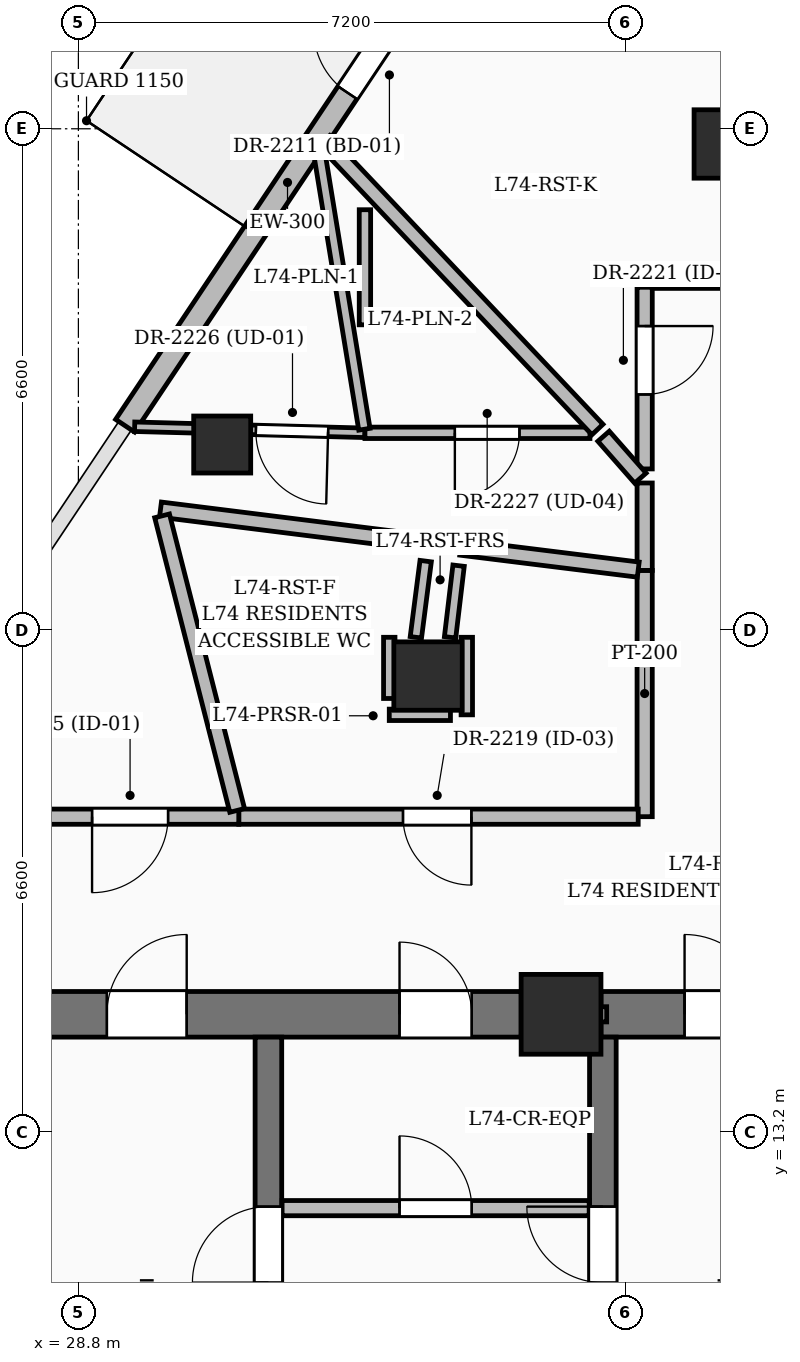
"""IFC4 building model, lengths in metres.
Left out: names, types, materials, properties, quantities, classifications, styles, units other than length and angle.
Written with IfcOpenShell. Run it as: python <this file> out.ifc"""

import sys

from ifc_helpers import new_model, si_unit, direction, frame, frame_2d, origin, origin_2d, place, context, subcontext, project, spatial, rectangle, extrude, element, fill, save


model = new_model("IFC4")
c1 = context("Model", 3, precision=1e-05, world=origin(), true_north=direction((0.0, 1.0)))
c2 = subcontext(c1, "Body", "Model", "MODEL_VIEW")
j1 = project(units=[si_unit("LENGTHUNIT", "METRE"), si_unit("PLANEANGLEUNIT", "RADIAN")], contexts=[c1])
p1 = place(None, origin())
s1 = spatial("IfcSite", under=j1, at=p1, CompositionType="ELEMENT")
p2 = place(p1, origin())
s2 = spatial("IfcBuilding", under=s1, at=p2, CompositionType="ELEMENT")
p3 = place(p2, frame((0.0, 0.0, 285.75)))
s3 = spatial("IfcBuildingStorey", under=s2, at=p3, CompositionType="ELEMENT", Elevation=285.75)
p4 = place(p3, frame((35.15, 14.75, 0.0), z_axis=(0.0, 0.0, 1.0), x_axis=(1.0, 0.0, 0.0)))
e1 = element("IfcColumn", 1, at=p4, inside=s3, PredefinedType="COLUMN", context=c2, shape_type="SweptSolid", body=[
    extrude(rectangle(XDim=1.05, YDim=1.05, at=origin_2d()), origin(), (0.0, 0.0, 1.0), 3.75),
])
for number, where, z_axis, x_axis in (
    (2, (37.35, 26.2, 0.0), (0.0, 0.0, 1.0), (1.0, 0.0, 0.0)),
    (3, (33.4, 19.2, 0.0), (0.0, 0.0, 1.0), (1.0, 0.0, 0.0)),
):
    element("IfcColumn", number, at=place(p3, frame(where, z_axis=z_axis, x_axis=x_axis)), inside=s3, PredefinedType="COLUMN", context=c2, shape_type="SweptSolid", body=[
        extrude(rectangle(XDim=0.9, YDim=0.9, at=origin_2d()), origin(), (0.0, 0.0, 1.0), 3.75),
    ])
p5 = place(p3, frame((28.075, 14.75, 0.0), z_axis=(0.0, 0.0, 1.0), x_axis=(1.0, 0.0, 0.0)))
e4 = element("IfcWall", 4, at=p5, inside=s3, PredefinedType="SHEAR", context=c2, shape_type="SweptSolid", body=[
    extrude(rectangle(XDim=6.55, YDim=0.6, at=frame_2d((3.275, 0.0))), origin(), (0.0, 0.0, 1.0), 3.75),
])
p6 = place(p5, frame((1.1, 0.0, 0.0)))
e5 = element("IfcOpeningElement", 5, at=p6, cuts=e4, PredefinedType="OPENING", context=c2, shape_type="SweptSolid", body=[
    extrude(rectangle(XDim=1.05, YDim=2.15, at=frame_2d((0.525, 1.075))), frame((0.0, 0.31, 0.0), z_axis=(0.0, -1.0, 0.0), x_axis=(1.0, 0.0, 0.0)), (0.0, 0.0, 1.0), 0.62),
])
p7 = place(p5, frame((4.95, 0.0, 0.0)))
e6 = element("IfcOpeningElement", 6, at=p7, cuts=e4, PredefinedType="OPENING", context=c2, shape_type="SweptSolid", body=[
    extrude(rectangle(XDim=0.95, YDim=2.15, at=frame_2d((0.475, 1.075))), frame((0.0, 0.31, 0.0), z_axis=(0.0, -1.0, 0.0), x_axis=(1.0, 0.0, 0.0)), (0.0, 0.0, 1.0), 0.62),
])
p8 = place(p3, frame((35.675, 14.75, 0.0), z_axis=(0.0, 0.0, 1.0), x_axis=(1.0, 0.0, 0.0)))
e7 = element("IfcWall", 7, at=p8, inside=s3, PredefinedType="SHEAR", context=c2, shape_type="SweptSolid", body=[
    extrude(rectangle(XDim=10.85, YDim=0.6, at=frame_2d((5.425, 0.0))), origin(), (0.0, 0.0, 1.0), 3.75),
])
p9 = place(p8, frame((1.1, 0.0, 0.0)))
e8 = element("IfcOpeningElement", 8, at=p9, cuts=e7, PredefinedType="OPENING", context=c2, shape_type="SweptSolid", body=[
    extrude(rectangle(XDim=1.05, YDim=2.15, at=frame_2d((0.525, 1.075))), frame((0.0, 0.31, 0.0), z_axis=(0.0, -1.0, 0.0), x_axis=(1.0, 0.0, 0.0)), (0.0, 0.0, 1.0), 0.62),
])
p10 = place(p8, frame((8.7, 0.0, 0.0)))
e9 = element("IfcOpeningElement", 9, at=p10, cuts=e7, PredefinedType="OPENING", context=c2, shape_type="SweptSolid", body=[
    extrude(rectangle(XDim=1.05, YDim=2.15, at=frame_2d((0.525, 1.075))), frame((0.0, 0.31, 0.0), z_axis=(0.0, -1.0, 0.0), x_axis=(1.0, 0.0, 0.0)), (0.0, 0.0, 1.0), 0.62),
])
p11 = place(p8, frame((3.825, 0.0, 0.0)))
e10 = element("IfcOpeningElement", 10, at=p11, cuts=e7, PredefinedType="OPENING", context=c2, shape_type="SweptSolid", body=[
    extrude(rectangle(XDim=1.2, YDim=2.2, at=frame_2d((0.6, 1.1))), frame((0.0, 0.31, 0.0), z_axis=(0.0, -1.0, 0.0), x_axis=(1.0, 0.0, 0.0)), (0.0, 0.0, 1.0), 0.62),
])
p12 = place(p8, frame((5.825, 0.0, 0.0)))
e11 = element("IfcOpeningElement", 11, at=p12, cuts=e7, PredefinedType="OPENING", context=c2, shape_type="SweptSolid", body=[
    extrude(rectangle(XDim=1.2, YDim=2.2, at=frame_2d((0.6, 1.1))), frame((0.0, 0.31, 0.0), z_axis=(0.0, -1.0, 0.0), x_axis=(1.0, 0.0, 0.0)), (0.0, 0.0, 1.0), 0.62),
])
p13 = place(p3, frame((31.3, 5.2, 0.0), z_axis=(0.0, 0.0, 1.0), x_axis=(0.0, 1.0, 0.0)))
e12 = element("IfcWall", 12, at=p13, inside=s3, PredefinedType="SOLIDWALL", context=c2, shape_type="SweptSolid", body=[
    extrude(rectangle(XDim=9.25, YDim=0.35, at=frame_2d((4.625, 0.0))), origin(), (0.0, 0.0, 1.0), 3.75),
])
p14 = place(p13, frame((6.02, 0.0, 0.0)))
e13 = element("IfcOpeningElement", 13, at=p14, cuts=e12, PredefinedType="OPENING", context=c2, shape_type="SweptSolid", body=[
    extrude(rectangle(XDim=1.0, YDim=2.15, at=frame_2d((0.5, 1.075))), frame((0.0, 0.185, 0.0), z_axis=(0.0, -1.0, 0.0), x_axis=(1.0, 0.0, 0.0)), (0.0, 0.0, 1.0), 0.37),
])
p15 = place(p3, frame((35.7, 5.2, 0.0), z_axis=(0.0, 0.0, 1.0), x_axis=(0.0, 1.0, 0.0)))
e14 = element("IfcWall", 14, at=p15, inside=s3, PredefinedType="SOLIDWALL", context=c2, shape_type="SweptSolid", body=[
    extrude(rectangle(XDim=9.25, YDim=0.35, at=frame_2d((4.625, 0.0))), origin(), (0.0, 0.0, 1.0), 3.75),
])
p16 = place(p15, frame((6.02, 0.0, 0.0)))
e15 = element("IfcOpeningElement", 15, at=p16, cuts=e14, PredefinedType="OPENING", context=c2, shape_type="SweptSolid", body=[
    extrude(rectangle(XDim=1.0, YDim=2.15, at=frame_2d((0.5, 1.075))), frame((0.0, 0.185, 0.0), z_axis=(0.0, -1.0, 0.0), x_axis=(1.0, 0.0, 0.0)), (0.0, 0.0, 1.0), 0.37),
])
p17 = place(p3, frame((30.692, 22.246, 0.0), z_axis=(0.0, 0.0, 1.0), x_axis=(1.0, 0.0, 0.0)))
e16 = element("IfcColumn", 16, at=p17, inside=s3, PredefinedType="COLUMN", context=c2, shape_type="SweptSolid", body=[
    extrude(rectangle(XDim=0.75, YDim=0.75, at=origin_2d()), origin(), (0.0, 0.0, 1.0), 3.75),
])
p18 = place(p3, frame((29.415, 22.493, 0.0), z_axis=(0.0, 0.0, 1.0), x_axis=(0.5552198311, 0.831703636612, 0.0)))
e17 = element("IfcWall", 17, at=p18, inside=s3, PredefinedType="SOLIDWALL", context=c2, shape_type="SweptSolid", body=[
    extrude(rectangle(XDim=7.696, YDim=0.3, at=frame_2d((3.848, 0.0))), origin(), (0.0, 0.0, 1.0), 3.45),
])
p19 = place(p18, frame((5.269, 0.0, 0.0)))
e18 = element("IfcOpeningElement", 18, at=p19, cuts=e17, PredefinedType="OPENING", context=c2, shape_type="SweptSolid", body=[
    extrude(rectangle(XDim=1.0, YDim=2.2, at=frame_2d((0.5, 1.1))), frame((0.0, 0.16, 0.0), z_axis=(0.0, -1.0, 0.0), x_axis=(1.0, 0.0, 0.0)), (0.0, 0.0, 1.0), 0.32),
])
p20 = place(p3, frame((34.72, 14.75, 0.0), z_axis=(0.0, 0.0, 1.0), x_axis=(1.0, 0.0, 0.0)))
e19 = element("IfcWall", 19, at=p20, inside=s3, PredefinedType="PARTITIONING", context=c2, shape_type="SweptSolid", body=[
    extrude(rectangle(XDim=1.03, YDim=0.2, at=frame_2d((0.515, 0.0))), origin(), (0.0, 0.0, 1.0), 2.635),
])
p21 = place(p3, frame((31.48, 12.2, 0.0), z_axis=(0.0, 0.0, 1.0), x_axis=(1.0, 0.0, 0.0)))
e20 = element("IfcWall", 20, at=p21, inside=s3, PredefinedType="PARTITIONING", context=c2, shape_type="SweptSolid", body=[
    extrude(rectangle(XDim=4.04, YDim=0.2, at=frame_2d((2.02, 0.0))), origin(), (0.0, 0.0, 1.0), 3.45),
])
p22 = place(p21, frame((1.545, 0.0, 0.0)))
e21 = element("IfcOpeningElement", 21, at=p22, cuts=e20, PredefinedType="OPENING", context=c2, shape_type="SweptSolid", body=[
    extrude(rectangle(XDim=0.95, YDim=2.15, at=frame_2d((0.475, 1.075))), frame((0.0, 0.11, 0.0), z_axis=(0.0, -1.0, 0.0), x_axis=(1.0, 0.0, 0.0)), (0.0, 0.0, 1.0), 0.22),
])
p23 = place(p3, frame((36.25, 20.59, 0.0), z_axis=(0.0, 0.0, 1.0), x_axis=(0.0, -1.0, 0.0)))
e22 = element("IfcWall", 22, at=p23, inside=s3, PredefinedType="PARTITIONING", context=c2, shape_type="SweptSolid", body=[
    extrude(rectangle(XDim=3.24, YDim=0.2, at=frame_2d((1.62, 0.0))), origin(), (0.0, 0.0, 1.0), 3.45),
])
p24 = place(p3, frame((36.165, 17.35, 0.0), z_axis=(0.0, 0.0, 1.0), x_axis=(-1.0, 0.0, 0.0)))
e23 = element("IfcWall", 23, at=p24, inside=s3, PredefinedType="PARTITIONING", context=c2, shape_type="SweptSolid", body=[
    extrude(rectangle(XDim=5.255, YDim=0.2, at=frame_2d((2.627, 0.0))), origin(), (0.0, 0.0, 1.0), 2.635),
])
p25 = place(p24, frame((2.194, 0.0, 0.0)))
e24 = element("IfcOpeningElement", 24, at=p25, cuts=e23, PredefinedType="OPENING", context=c2, shape_type="SweptSolid", body=[
    extrude(rectangle(XDim=0.9, YDim=2.1, at=frame_2d((0.45, 1.05))), frame((0.0, 0.11, 0.0), z_axis=(0.0, -1.0, 0.0), x_axis=(1.0, 0.0, 0.0)), (0.0, 0.0, 1.0), 0.22),
])
p26 = place(p3, frame((30.91, 17.35, 0.0), z_axis=(0.0, 0.0, 1.0), x_axis=(-1.0, 0.0, 0.0)))
e25 = element("IfcWall", 25, at=p26, inside=s3, PredefinedType="PARTITIONING", context=c2, shape_type="SweptSolid", body=[
    extrude(rectangle(XDim=2.86, YDim=0.2, at=frame_2d((1.43, 0.0))), origin(), (0.0, 0.0, 1.0), 3.45),
])
p27 = place(p26, frame((0.93, 0.0, 0.0)))
e26 = element("IfcOpeningElement", 26, at=p27, cuts=e25, PredefinedType="OPENING", context=c2, shape_type="SweptSolid", body=[
    extrude(rectangle(XDim=1.0, YDim=2.2, at=frame_2d((0.5, 1.1))), frame((0.0, 0.11, 0.0), z_axis=(0.0, -1.0, 0.0), x_axis=(1.0, 0.0, 0.0)), (0.0, 0.0, 1.0), 0.22),
])
p28 = place(p3, frame((36.25, 21.74, 0.0), z_axis=(0.0, 0.0, 1.0), x_axis=(0.0, -1.0, 0.0)))
e27 = element("IfcWall", 27, at=p28, inside=s3, PredefinedType="PARTITIONING", context=c2, shape_type="SweptSolid", body=[
    extrude(rectangle(XDim=1.15, YDim=0.2, at=frame_2d((0.575, 0.0))), origin(), (0.0, 0.0, 1.0), 3.45),
])
p29 = place(p3, frame((38.115, 24.4, 0.0), z_axis=(0.0, 0.0, 1.0), x_axis=(-1.0, 0.0, 0.0)))
e28 = element("IfcWall", 28, at=p29, inside=s3, PredefinedType="PARTITIONING", context=c2, shape_type="SweptSolid", body=[
    extrude(rectangle(XDim=1.865, YDim=0.2, at=frame_2d((0.933, 0.0))), origin(), (0.0, 0.0, 1.0), 2.635),
])
p30 = place(p3, frame((36.25, 24.315, 0.0), z_axis=(0.0, 0.0, 1.0), x_axis=(0.0, -1.0, 0.0)))
e29 = element("IfcWall", 29, at=p30, inside=s3, PredefinedType="PARTITIONING", context=c2, shape_type="SweptSolid", body=[
    extrude(rectangle(XDim=2.39, YDim=0.2, at=frame_2d((1.195, 0.0))), origin(), (0.0, 0.0, 1.0), 2.635),
])
p31 = place(p30, frame((0.51, 0.0, 0.0)))
e30 = element("IfcOpeningElement", 30, at=p31, cuts=e29, PredefinedType="OPENING", context=c2, shape_type="SweptSolid", body=[
    extrude(rectangle(XDim=0.9, YDim=2.1, at=frame_2d((0.45, 1.05))), frame((0.0, 0.11, 0.0), z_axis=(0.0, -1.0, 0.0), x_axis=(1.0, 0.0, 0.0)), (0.0, 0.0, 1.0), 0.22),
])
p32 = place(p3, frame((33.4, 20.95, 0.0), z_axis=(0.0, 0.0, 1.0), x_axis=(-0.992279994178, 0.124017793696, 0.0)))
e31 = element("IfcWall", 31, at=p32, inside=s3, PredefinedType="PARTITIONING", context=c2, shape_type="SweptSolid", body=[
    extrude(rectangle(XDim=3.547, YDim=0.2, at=frame_2d((1.774, 0.0))), origin(), (0.0, 0.0, 1.0), 2.641),
])
p33 = place(p3, frame((29.901, 21.308, 0.0), z_axis=(0.0, 0.0, 1.0), x_axis=(0.24705765536, -0.969000781696, 0.0)))
e32 = element("IfcWall", 32, at=p33, inside=s3, PredefinedType="PARTITIONING", context=c2, shape_type="SweptSolid", body=[
    extrude(rectangle(XDim=3.999, YDim=0.2, at=frame_2d((2.0, 0.0))), origin(), (0.0, 0.0, 1.0), 2.641),
])
p34 = place(p3, frame((36.166, 20.601, 0.0), z_axis=(0.0, 0.0, 1.0), x_axis=(-0.992414530334, 0.122936568936, 0.0)))
e33 = element("IfcWall", 33, at=p34, inside=s3, PredefinedType="PARTITIONING", context=c2, shape_type="SweptSolid", body=[
    extrude(rectangle(XDim=2.353, YDim=0.2, at=frame_2d((1.177, 0.0))), origin(), (0.0, 0.0, 1.0), 2.635),
])
p35 = place(p3, frame((32.57, 22.4, 0.0), z_axis=(0.0, 0.0, 1.0), x_axis=(-0.999650958783, 0.02641894404, 0.0)))
e34 = element("IfcWall", 34, at=p35, inside=s3, PredefinedType="PARTITIONING", context=c2, shape_type="SweptSolid", body=[
    extrude(rectangle(XDim=3.031, YDim=0.125, at=frame_2d((1.516, 0.0))), origin(), (0.0, 0.0, 1.0), 3.45),
])
p36 = place(p35, frame((0.485, 0.0, 0.0)))
e35 = element("IfcOpeningElement", 35, at=p36, cuts=e34, PredefinedType="OPENING", context=c2, shape_type="SweptSolid", body=[
    extrude(rectangle(XDim=0.95, YDim=2.2, at=frame_2d((0.475, 1.1))), frame((0.0, 0.072, 0.0), z_axis=(0.0, -1.0, 0.0), x_axis=(1.0, 0.0, 0.0)), (0.0, 0.0, 1.0), 0.145),
])
p37 = place(p3, frame((35.53, 22.4, 0.0), z_axis=(0.0, 0.0, 1.0), x_axis=(-1.0, 0.0, 0.0)))
e36 = element("IfcWall", 36, at=p37, inside=s3, PredefinedType="PARTITIONING", context=c2, shape_type="SweptSolid", body=[
    extrude(rectangle(XDim=2.96, YDim=0.15, at=frame_2d((1.48, 0.0))), origin(), (0.0, 0.0, 1.0), 2.635),
])
p38 = place(p37, frame((0.927, 0.0, 0.0)))
e37 = element("IfcOpeningElement", 37, at=p38, cuts=e36, PredefinedType="OPENING", context=c2, shape_type="SweptSolid", body=[
    extrude(rectangle(XDim=0.85, YDim=2.1, at=frame_2d((0.425, 1.05))), frame((0.0, 0.085, 0.0), z_axis=(0.0, -1.0, 0.0), x_axis=(1.0, 0.0, 0.0)), (0.0, 0.0, 1.0), 0.17),
])
p39 = place(p3, frame((36.194, 21.804, 0.0), z_axis=(0.0, 0.0, 1.0), x_axis=(-0.659869913994, 0.751379861724, 0.0)))
e38 = element("IfcWall", 38, at=p39, inside=s3, PredefinedType="PARTITIONING", context=c2, shape_type="SweptSolid", body=[
    extrude(rectangle(XDim=0.734, YDim=0.2, at=frame_2d((0.367, 0.0))), origin(), (0.0, 0.0, 1.0), 3.45),
])
p40 = place(p3, frame((32.563, 22.447, 0.0), z_axis=(0.0, 0.0, 1.0), x_axis=(-0.161074254275, 0.986942290415, 0.0)))
e39 = element("IfcWall", 39, at=p40, inside=s3, PredefinedType="PARTITIONING", context=c2, shape_type="SweptSolid", body=[
    extrude(rectangle(XDim=3.704, YDim=0.15, at=frame_2d((1.852, 0.0))), origin(), (0.0, 0.0, 1.0), 2.641),
])
p41 = place(p3, frame((35.629, 22.444, 0.0), z_axis=(0.0, 0.0, 1.0), x_axis=(-0.687396257766, 0.726282579173, 0.0)))
e40 = element("IfcWall", 40, at=p41, inside=s3, PredefinedType="PARTITIONING", context=c2, shape_type="SweptSolid", body=[
    extrude(rectangle(XDim=5.23, YDim=0.2, at=frame_2d((2.615, 0.0))), origin(), (0.0, 0.0, 1.0), 2.635),
])
p42 = place(p3, frame((33.802, 20.652, 0.0), z_axis=(0.0, 0.0, 1.0), x_axis=(-0.118110191018, -0.993000494853, 0.0)))
e41 = element("IfcWall", 41, at=p42, inside=s3, PredefinedType="PARTITIONING", context=c2, shape_type="SweptSolid", body=[
    extrude(rectangle(XDim=0.949, YDim=0.15, at=frame_2d((0.474, 0.0))), origin(), (0.0, 0.0, 1.0), 2.635),
])
p43 = place(p3, frame((33.91, 19.71, 0.0), z_axis=(0.0, 0.0, 1.0), x_axis=(0.0, -1.0, 0.0)))
e42 = element("IfcWall", 42, at=p43, inside=s3, PredefinedType="PARTITIONING", context=c2, shape_type="SweptSolid", body=[
    extrude(rectangle(XDim=1.02, YDim=0.15, at=frame_2d((0.51, 0.0))), origin(), (0.0, 0.0, 1.0), 2.635),
])
p44 = place(p3, frame((33.695, 18.69, 0.0), z_axis=(0.0, 0.0, 1.0), x_axis=(-1.0, 0.0, 0.0)))
e43 = element("IfcWall", 43, at=p44, inside=s3, PredefinedType="PARTITIONING", context=c2, shape_type="SweptSolid", body=[
    extrude(rectangle(XDim=0.805, YDim=0.15, at=frame_2d((0.403, 0.0))), origin(), (0.0, 0.0, 1.0), 2.635),
])
p45 = place(p3, frame((32.89, 18.905, 0.0), z_axis=(0.0, 0.0, 1.0), x_axis=(0.0, 1.0, 0.0)))
e44 = element("IfcWall", 44, at=p45, inside=s3, PredefinedType="PARTITIONING", context=c2, shape_type="SweptSolid", body=[
    extrude(rectangle(XDim=0.805, YDim=0.15, at=frame_2d((0.402, 0.0))), origin(), (0.0, 0.0, 1.0), 2.785),
])
p46 = place(p3, frame((33.24, 19.71, 0.0), z_axis=(0.0, 0.0, 1.0), x_axis=(0.127603253924, 0.991825291867, 0.0)))
e45 = element("IfcWall", 45, at=p46, inside=s3, PredefinedType="PARTITIONING", context=c2, shape_type="SweptSolid", body=[
    extrude(rectangle(XDim=1.01, YDim=0.15, at=frame_2d((0.505, 0.0))), origin(), (0.0, 0.0, 1.0), 3.45),
])
p47 = place(p3, frame((32.57, 25.335, 0.0), z_axis=(0.0, 0.0, 1.0), x_axis=(0.0, -1.0, 0.0)))
e46 = element("IfcWall", 46, at=p47, inside=s3, PredefinedType="PARTITIONING", context=c2, shape_type="SweptSolid", body=[
    extrude(rectangle(XDim=1.514, YDim=0.15, at=frame_2d((0.757, 0.0))), origin(), (0.0, 0.0, 1.0), 2.641),
])
p48 = place(p19, origin())
e47 = element("IfcDoor", 47, at=p48, inside=s3, OperationType="SINGLE_SWING_RIGHT", PredefinedType="DOOR", context=c2, shape_type="SweptSolid", body=[
    extrude(rectangle(XDim=1.0, YDim=2.2, at=frame_2d((0.5, 1.1))), frame((0.0, 0.025, 0.0), z_axis=(0.0, -1.0, 0.0), x_axis=(1.0, 0.0, 0.0)), (0.0, 0.0, 1.0), 0.05),
])
fill(e18, e47)
p49 = place(p6, origin())
e48 = element("IfcDoor", 48, at=p49, inside=s3, OperationType="SINGLE_SWING_RIGHT", PredefinedType="DOOR", context=c2, shape_type="SweptSolid", body=[
    extrude(rectangle(XDim=1.05, YDim=2.15, at=frame_2d((0.525, 1.075))), frame((0.0, 0.025, 0.0), z_axis=(0.0, -1.0, 0.0), x_axis=(1.0, 0.0, 0.0)), (0.0, 0.0, 1.0), 0.05),
])
fill(e5, e48)
p50 = place(p9, origin())
e49 = element("IfcDoor", 49, at=p50, inside=s3, OperationType="SINGLE_SWING_LEFT", PredefinedType="DOOR", context=c2, shape_type="SweptSolid", body=[
    extrude(rectangle(XDim=1.05, YDim=2.15, at=frame_2d((0.525, 1.075))), frame((0.0, 0.025, 0.0), z_axis=(0.0, -1.0, 0.0), x_axis=(1.0, 0.0, 0.0)), (0.0, 0.0, 1.0), 0.05),
])
fill(e8, e49)
p51 = place(p14, origin())
e50 = element("IfcDoor", 50, at=p51, inside=s3, OperationType="SINGLE_SWING_LEFT", PredefinedType="DOOR", context=c2, shape_type="SweptSolid", body=[
    extrude(rectangle(XDim=1.0, YDim=2.15, at=frame_2d((0.5, 1.075))), frame((0.0, 0.025, 0.0), z_axis=(0.0, -1.0, 0.0), x_axis=(1.0, 0.0, 0.0)), (0.0, 0.0, 1.0), 0.05),
])
fill(e13, e50)
p52 = place(p16, origin())
e51 = element("IfcDoor", 51, at=p52, inside=s3, OperationType="SINGLE_SWING_RIGHT", PredefinedType="DOOR", context=c2, shape_type="SweptSolid", body=[
    extrude(rectangle(XDim=1.0, YDim=2.15, at=frame_2d((0.5, 1.075))), frame((0.0, 0.025, 0.0), z_axis=(0.0, -1.0, 0.0), x_axis=(1.0, 0.0, 0.0)), (0.0, 0.0, 1.0), 0.05),
])
fill(e15, e51)
p53 = place(p22, origin())
e52 = element("IfcDoor", 52, at=p53, inside=s3, OperationType="SINGLE_SWING_LEFT", PredefinedType="DOOR", context=c2, shape_type="SweptSolid", body=[
    extrude(rectangle(XDim=0.95, YDim=2.15, at=frame_2d((0.475, 1.075))), frame((0.0, 0.025, 0.0), z_axis=(0.0, -1.0, 0.0), x_axis=(1.0, 0.0, 0.0)), (0.0, 0.0, 1.0), 0.05),
])
fill(e21, e52)
p54 = place(p7, origin())
e53 = element("IfcDoor", 53, at=p54, inside=s3, OperationType="SINGLE_SWING_LEFT", PredefinedType="DOOR", context=c2, shape_type="SweptSolid", body=[
    extrude(rectangle(XDim=0.95, YDim=2.15, at=frame_2d((0.475, 1.075))), frame((0.0, 0.025, 0.0), z_axis=(0.0, -1.0, 0.0), x_axis=(1.0, 0.0, 0.0)), (0.0, 0.0, 1.0), 0.05),
])
fill(e6, e53)
p55 = place(p25, origin())
e54 = element("IfcDoor", 54, at=p55, inside=s3, OperationType="SINGLE_SWING_LEFT", PredefinedType="DOOR", context=c2, shape_type="SweptSolid", body=[
    extrude(rectangle(XDim=0.9, YDim=2.1, at=frame_2d((0.45, 1.05))), frame((0.0, 0.025, 0.0), z_axis=(0.0, -1.0, 0.0), x_axis=(1.0, 0.0, 0.0)), (0.0, 0.0, 1.0), 0.05),
])
fill(e24, e54)
p56 = place(p31, origin())
e55 = element("IfcDoor", 55, at=p56, inside=s3, OperationType="SINGLE_SWING_LEFT", PredefinedType="DOOR", context=c2, shape_type="SweptSolid", body=[
    extrude(rectangle(XDim=0.9, YDim=2.1, at=frame_2d((0.45, 1.05))), frame((0.0, 0.025, 0.0), z_axis=(0.0, -1.0, 0.0), x_axis=(1.0, 0.0, 0.0)), (0.0, 0.0, 1.0), 0.05),
])
fill(e30, e55)
p57 = place(p27, origin())
e56 = element("IfcDoor", 56, at=p57, inside=s3, OperationType="SINGLE_SWING_RIGHT", PredefinedType="DOOR", context=c2, shape_type="SweptSolid", body=[
    extrude(rectangle(XDim=1.0, YDim=2.2, at=frame_2d((0.5, 1.1))), frame((0.0, 0.025, 0.0), z_axis=(0.0, -1.0, 0.0), x_axis=(1.0, 0.0, 0.0)), (0.0, 0.0, 1.0), 0.05),
])
fill(e26, e56)
p58 = place(p36, origin())
e57 = element("IfcDoor", 57, at=p58, inside=s3, OperationType="SINGLE_SWING_LEFT", PredefinedType="DOOR", context=c2, shape_type="SweptSolid", body=[
    extrude(rectangle(XDim=0.95, YDim=2.2, at=frame_2d((0.475, 1.1))), frame((0.0, 0.025, 0.0), z_axis=(0.0, -1.0, 0.0), x_axis=(1.0, 0.0, 0.0)), (0.0, 0.0, 1.0), 0.05),
])
fill(e35, e57)
p59 = place(p38, origin())
e58 = element("IfcDoor", 58, at=p59, inside=s3, OperationType="SINGLE_SWING_RIGHT", PredefinedType="DOOR", context=c2, shape_type="SweptSolid", body=[
    extrude(rectangle(XDim=0.85, YDim=2.1, at=frame_2d((0.425, 1.05))), frame((0.0, 0.025, 0.0), z_axis=(0.0, -1.0, 0.0), x_axis=(1.0, 0.0, 0.0)), (0.0, 0.0, 1.0), 0.05),
])
fill(e37, e58)
save(model, sys.argv[1])
